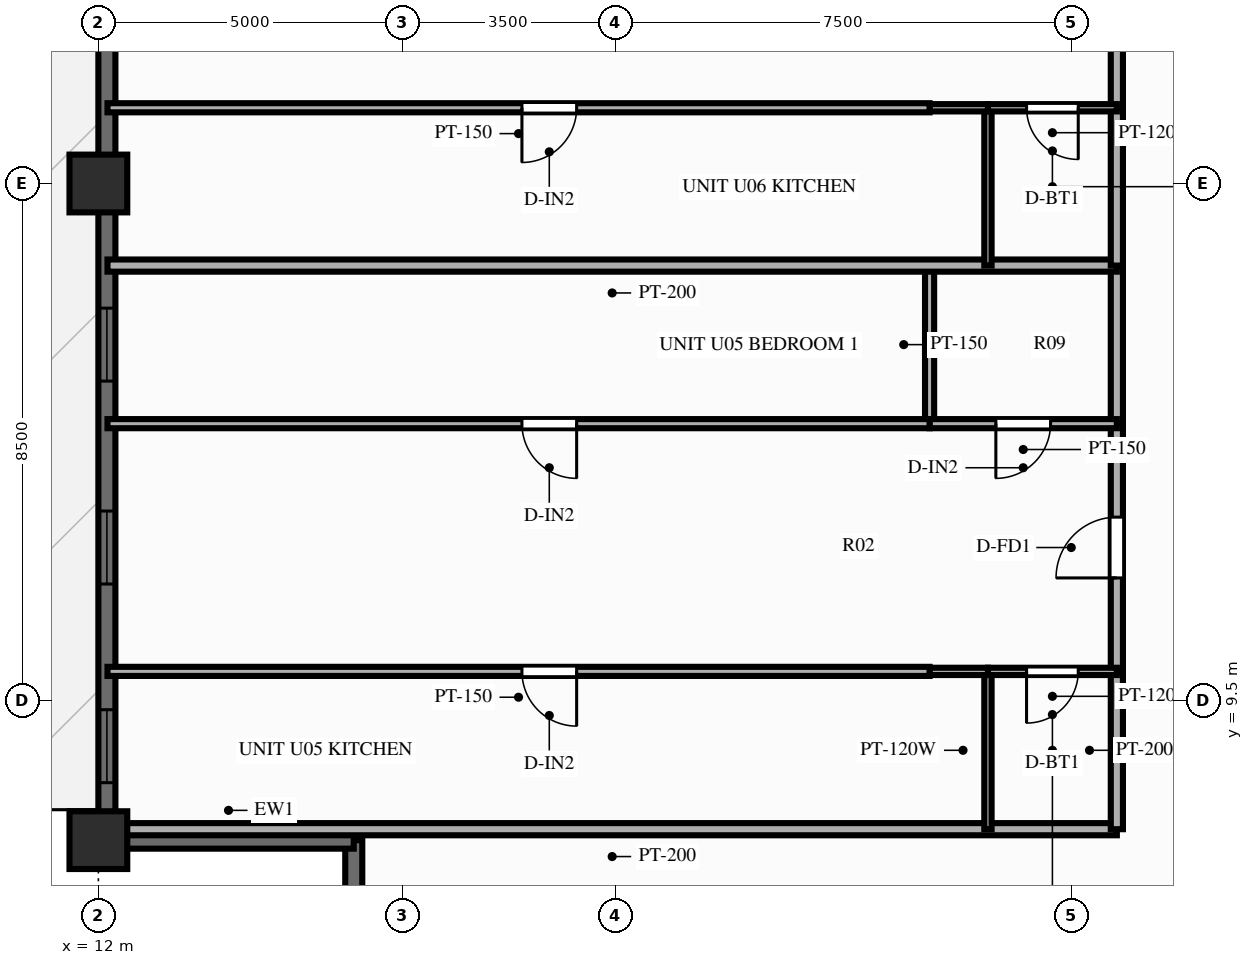
"""IFC4 building model, lengths in metres.
Left out: names, types, materials, properties, quantities, classifications, styles, units other than length and angle.
Written with IfcOpenShell. Run it as: python <this file> out.ifc"""

import sys

from ifc_helpers import new_model, si_unit, direction, frame, frame_2d, origin, origin_2d, place, context, subcontext, project, spatial, rectangle, extrude, source, transform, mapped, element, fill, save


model = new_model("IFC4")
c1 = context("Model", 3, precision=1e-05, world=origin(), true_north=direction((0.0, 1.0)))
c2 = subcontext(c1, "Body", "Model", "MODEL_VIEW")
j1 = project(units=[si_unit("LENGTHUNIT", "METRE"), si_unit("PLANEANGLEUNIT", "RADIAN")], contexts=[c1])
p1 = place(None, origin())
s1 = spatial("IfcSite", under=j1, at=p1, CompositionType="ELEMENT")
p2 = place(p1, origin())
s2 = spatial("IfcBuilding", under=s1, at=p2, CompositionType="ELEMENT")
p3 = place(p2, frame((0.0, 0.0, 113.85)))
s3 = spatial("IfcBuildingStorey", under=s2, at=p3, CompositionType="ELEMENT", Elevation=113.85)
m1 = source(origin(), c2, "Body", "SweptSolid", [
    extrude(rectangle(XDim=0.95, YDim=0.95, at=origin_2d()), origin(), (0.0, 0.0, 1.0), 3.0),
])
for number, where, z_axis, x_axis in (
    (1, (12.0, 18.0, 0.0), (0.0, 0.0, 1.0), (1.0, 0.0, 0.0)),
    (2, (12.0, 7.2, 0.0), (0.0, 0.0, 1.0), (1.0, 0.0, 0.0)),
):
    element("IfcColumn", number, at=place(p3, frame(where, z_axis=z_axis, x_axis=x_axis)), inside=s3, PredefinedType="COLUMN", context=c2, shape_type="MappedRepresentation", body=[
        mapped(m1, transform((0.0, 0.0, 0.0), scale=1.0)),
    ])
p4 = place(p3, frame((12.14, 7.2, 0.0), z_axis=(0.0, 0.0, 1.0), x_axis=(0.0, 1.0, 0.0)))
e3 = element("IfcWall", 3, at=p4, inside=s3, PredefinedType="SOLIDWALL", context=c2, shape_type="SweptSolid", body=[
    extrude(rectangle(XDim=39.6, YDim=0.28, at=frame_2d((19.8, 0.0))), origin(), (0.0, 0.0, 1.0), 2.28),
])
p5 = place(p4, frame((0.945, 0.0, 0.25)))
e4 = element("IfcOpeningElement", 4, at=p5, cuts=e3, PredefinedType="OPENING", context=c2, shape_type="SweptSolid", body=[
    extrude(rectangle(XDim=1.2, YDim=1.5, at=frame_2d((0.6, 0.75))), frame((0.0, 0.152, 0.0), z_axis=(0.0, -1.0, 0.0), x_axis=(1.0, 0.0, 0.0)), (0.0, 0.0, 1.0), 0.304),
])
p6 = place(p4, frame((4.213, 0.0, 0.25)))
e5 = element("IfcOpeningElement", 5, at=p6, cuts=e3, PredefinedType="OPENING", context=c2, shape_type="SweptSolid", body=[
    extrude(rectangle(XDim=1.2, YDim=1.5, at=frame_2d((0.6, 0.75))), frame((0.0, 0.152, 0.0), z_axis=(0.0, -1.0, 0.0), x_axis=(1.0, 0.0, 0.0)), (0.0, 0.0, 1.0), 0.304),
])
p7 = place(p4, frame((7.55, 0.0, 0.25)))
e6 = element("IfcOpeningElement", 6, at=p7, cuts=e3, PredefinedType="OPENING", context=c2, shape_type="SweptSolid", body=[
    extrude(rectangle(XDim=1.2, YDim=1.5, at=frame_2d((0.6, 0.75))), frame((0.0, 0.152, 0.0), z_axis=(0.0, -1.0, 0.0), x_axis=(1.0, 0.0, 0.0)), (0.0, 0.0, 1.0), 0.304),
])
p8 = place(p4, frame((13.483, 0.0, 0.25)))
e7 = element("IfcOpeningElement", 7, at=p8, cuts=e3, PredefinedType="OPENING", context=c2, shape_type="SweptSolid", body=[
    extrude(rectangle(XDim=1.2, YDim=1.5, at=frame_2d((0.6, 0.75))), frame((0.0, 0.152, 0.0), z_axis=(0.0, -1.0, 0.0), x_axis=(1.0, 0.0, 0.0)), (0.0, 0.0, 1.0), 0.304),
])
p9 = place(p4, frame((16.82, 0.0, 0.25)))
e8 = element("IfcOpeningElement", 8, at=p9, cuts=e3, PredefinedType="OPENING", context=c2, shape_type="SweptSolid", body=[
    extrude(rectangle(XDim=1.2, YDim=1.5, at=frame_2d((0.6, 0.75))), frame((0.0, 0.152, 0.0), z_axis=(0.0, -1.0, 0.0), x_axis=(1.0, 0.0, 0.0)), (0.0, 0.0, 1.0), 0.304),
])
p10 = place(p4, frame((19.2, 0.0, 0.25)))
e9 = element("IfcOpeningElement", 9, at=p10, cuts=e3, PredefinedType="OPENING", context=c2, shape_type="SweptSolid", body=[
    extrude(rectangle(XDim=1.2, YDim=1.5, at=frame_2d((0.6, 0.75))), frame((0.0, 0.152, 0.0), z_axis=(0.0, -1.0, 0.0), x_axis=(1.0, 0.0, 0.0)), (0.0, 0.0, 1.0), 0.304),
])
p11 = place(p4, frame((21.992, 0.0, 0.0)))
e10 = element("IfcOpeningElement", 10, at=p11, cuts=e3, PredefinedType="OPENING", context=c2, shape_type="SweptSolid", body=[
    extrude(rectangle(XDim=1.6, YDim=2.15, at=frame_2d((0.8, 1.075))), frame((0.0, 0.152, 0.0), z_axis=(0.0, -1.0, 0.0), x_axis=(1.0, 0.0, 0.0)), (0.0, 0.0, 1.0), 0.304),
])
p12 = place(p4, frame((25.529, 0.0, 0.25)))
e11 = element("IfcOpeningElement", 11, at=p12, cuts=e3, PredefinedType="OPENING", context=c2, shape_type="SweptSolid", body=[
    extrude(rectangle(XDim=1.2, YDim=1.5, at=frame_2d((0.6, 0.75))), frame((0.0, 0.152, 0.0), z_axis=(0.0, -1.0, 0.0), x_axis=(1.0, 0.0, 0.0)), (0.0, 0.0, 1.0), 0.304),
])
p13 = place(p4, frame((29.349, 0.0, 0.25)))
e12 = element("IfcOpeningElement", 12, at=p13, cuts=e3, PredefinedType="OPENING", context=c2, shape_type="SweptSolid", body=[
    extrude(rectangle(XDim=0.7, YDim=1.5, at=frame_2d((0.35, 0.75))), frame((0.0, 0.152, 0.0), z_axis=(0.0, -1.0, 0.0), x_axis=(1.0, 0.0, 0.0)), (0.0, 0.0, 1.0), 0.304),
])
p14 = place(p4, frame((31.285, 0.0, 0.25)))
e13 = element("IfcOpeningElement", 13, at=p14, cuts=e3, PredefinedType="OPENING", context=c2, shape_type="SweptSolid", body=[
    extrude(rectangle(XDim=1.2, YDim=1.5, at=frame_2d((0.6, 0.75))), frame((0.0, 0.152, 0.0), z_axis=(0.0, -1.0, 0.0), x_axis=(1.0, 0.0, 0.0)), (0.0, 0.0, 1.0), 0.304),
])
p15 = place(p4, frame((34.252, 0.0, 0.25)))
e14 = element("IfcOpeningElement", 14, at=p15, cuts=e3, PredefinedType="OPENING", context=c2, shape_type="SweptSolid", body=[
    extrude(rectangle(XDim=1.2, YDim=1.5, at=frame_2d((0.6, 0.75))), frame((0.0, 0.152, 0.0), z_axis=(0.0, -1.0, 0.0), x_axis=(1.0, 0.0, 0.0)), (0.0, 0.0, 1.0), 0.304),
])
p16 = place(p4, frame((37.151, 0.0, 0.25)))
e15 = element("IfcOpeningElement", 15, at=p16, cuts=e3, PredefinedType="OPENING", context=c2, shape_type="SweptSolid", body=[
    extrude(rectangle(XDim=1.2, YDim=1.5, at=frame_2d((0.6, 0.75))), frame((0.0, 0.152, 0.0), z_axis=(0.0, -1.0, 0.0), x_axis=(1.0, 0.0, 0.0)), (0.0, 0.0, 1.0), 0.304),
])
for number, where, z_axis, x_axis in (
    (16, (16.2, 3.08, 0.0), (0.0, 0.0, 1.0), (0.0, 1.0, 0.0)),
    (17, (12.08, 7.2, 0.0), (0.0, 0.0, 1.0), (1.0, 0.0, 0.0)),
):
    element("IfcWall", number, at=place(p3, frame(where, z_axis=z_axis, x_axis=x_axis)), inside=s3, PredefinedType="SOLIDWALL", context=c2, shape_type="SweptSolid", body=[
        extrude(rectangle(XDim=4.12, YDim=0.28, at=frame_2d((2.06, 0.0))), origin(), (0.0, 0.0, 1.0), 2.28),
    ])
p17 = place(p3, frame((28.75, 7.38, 0.0), z_axis=(0.0, 0.0, 1.0), x_axis=(-1.0, 0.0, 0.0)))
e18 = element("IfcWall", 18, at=p17, inside=s3, PredefinedType="PARTITIONING", context=c2, shape_type="SweptSolid", body=[
    extrude(rectangle(XDim=16.6, YDim=0.2, at=frame_2d((8.3, 0.0))), origin(), (0.0, 0.0, 1.0), 2.79),
])
p18 = place(p3, frame((28.75, 7.38, 0.0), z_axis=(0.0, 0.0, 1.0), x_axis=(0.0, 1.0, 0.0)))
e19 = element("IfcWall", 19, at=p18, inside=s3, PredefinedType="PARTITIONING", context=c2, shape_type="SweptSolid", body=[
    extrude(rectangle(XDim=2.596, YDim=0.2, at=frame_2d((1.298, 0.0))), origin(), (0.0, 0.0, 1.0), 2.79),
])
p19 = place(p3, frame((28.75, 9.976, 0.0), z_axis=(0.0, 0.0, 1.0), x_axis=(0.0, 1.0, 0.0)))
e20 = element("IfcWall", 20, at=p19, inside=s3, PredefinedType="PARTITIONING", context=c2, shape_type="SweptSolid", body=[
    extrude(rectangle(XDim=4.074, YDim=0.2, at=frame_2d((2.037, 0.0))), origin(), (0.0, 0.0, 1.0), 2.79),
])
p20 = place(p19, frame((1.537, 0.0, 0.0)))
e21 = element("IfcOpeningElement", 21, at=p20, cuts=e20, PredefinedType="OPENING", context=c2, shape_type="SweptSolid", body=[
    extrude(rectangle(XDim=1.0, YDim=2.15, at=frame_2d((0.5, 1.075))), frame((0.0, 0.112, 0.0), z_axis=(0.0, -1.0, 0.0), x_axis=(1.0, 0.0, 0.0)), (0.0, 0.0, 1.0), 0.224),
])
p21 = place(p3, frame((28.75, 14.05, 0.0), z_axis=(0.0, 0.0, 1.0), x_axis=(0.0, 1.0, 0.0)))
e22 = element("IfcWall", 22, at=p21, inside=s3, PredefinedType="PARTITIONING", context=c2, shape_type="SweptSolid", body=[
    extrude(rectangle(XDim=2.6, YDim=0.2, at=frame_2d((1.3, 0.0))), origin(), (0.0, 0.0, 1.0), 2.79),
])
p22 = place(p3, frame((26.63, 7.38, 0.0), z_axis=(0.0, 0.0, 1.0), x_axis=(0.0, 1.0, 0.0)))
e23 = element("IfcWall", 23, at=p22, inside=s3, PredefinedType="PARTITIONING", context=c2, shape_type="SweptSolid", body=[
    extrude(rectangle(XDim=2.596, YDim=0.12, at=frame_2d((1.298, 0.0))), origin(), (0.0, 0.0, 1.0), 2.79),
])
p23 = place(p3, frame((25.67, 14.05, 0.0), z_axis=(0.0, 0.0, 1.0), x_axis=(0.0, 1.0, 0.0)))
e24 = element("IfcWall", 24, at=p23, inside=s3, PredefinedType="PARTITIONING", context=c2, shape_type="SweptSolid", body=[
    extrude(rectangle(XDim=2.6, YDim=0.15, at=frame_2d((1.3, 0.0))), origin(), (0.0, 0.0, 1.0), 2.79),
])
p24 = place(p3, frame((28.75, 9.976, 0.0), z_axis=(0.0, 0.0, 1.0), x_axis=(-1.0, 0.0, 0.0)))
e25 = element("IfcWall", 25, at=p24, inside=s3, PredefinedType="PARTITIONING", context=c2, shape_type="SweptSolid", body=[
    extrude(rectangle(XDim=2.12, YDim=0.12, at=frame_2d((1.06, 0.0))), origin(), (0.0, 0.0, 1.0), 2.79),
])
p25 = place(p24, frame((0.635, 0.0, 0.0)))
e26 = element("IfcOpeningElement", 26, at=p25, cuts=e25, PredefinedType="OPENING", context=c2, shape_type="SweptSolid", body=[
    extrude(rectangle(XDim=0.85, YDim=2.05, at=frame_2d((0.425, 1.025))), frame((0.0, 0.072, 0.0), z_axis=(0.0, -1.0, 0.0), x_axis=(1.0, 0.0, 0.0)), (0.0, 0.0, 1.0), 0.144),
])
p26 = place(p3, frame((26.63, 9.976, 0.0), z_axis=(0.0, 0.0, 1.0), x_axis=(-1.0, 0.0, 0.0)))
e27 = element("IfcWall", 27, at=p26, inside=s3, PredefinedType="PARTITIONING", context=c2, shape_type="SweptSolid", body=[
    extrude(rectangle(XDim=0.96, YDim=0.12, at=frame_2d((0.48, 0.0))), origin(), (0.0, 0.0, 1.0), 2.79),
])
p27 = place(p3, frame((25.67, 9.976, 0.0), z_axis=(0.0, 0.0, 1.0), x_axis=(-1.0, 0.0, 0.0)))
e28 = element("IfcWall", 28, at=p27, inside=s3, PredefinedType="PARTITIONING", context=c2, shape_type="SweptSolid", body=[
    extrude(rectangle(XDim=13.52, YDim=0.15, at=frame_2d((6.76, 0.0))), origin(), (0.0, 0.0, 1.0), 2.79),
])
p28 = place(p27, frame((5.804, 0.0, 0.0)))
e29 = element("IfcOpeningElement", 29, at=p28, cuts=e28, PredefinedType="OPENING", context=c2, shape_type="SweptSolid", body=[
    extrude(rectangle(XDim=0.9, YDim=2.1, at=frame_2d((0.45, 1.05))), frame((0.0, 0.087, 0.0), z_axis=(0.0, -1.0, 0.0), x_axis=(1.0, 0.0, 0.0)), (0.0, 0.0, 1.0), 0.174),
])
p29 = place(p3, frame((28.75, 14.05, 0.0), z_axis=(0.0, 0.0, 1.0), x_axis=(-1.0, 0.0, 0.0)))
e30 = element("IfcWall", 30, at=p29, inside=s3, PredefinedType="PARTITIONING", context=c2, shape_type="SweptSolid", body=[
    extrude(rectangle(XDim=3.08, YDim=0.15, at=frame_2d((1.54, 0.0))), origin(), (0.0, 0.0, 1.0), 2.79),
])
p30 = place(p29, frame((1.09, 0.0, 0.0)))
e31 = element("IfcOpeningElement", 31, at=p30, cuts=e30, PredefinedType="OPENING", context=c2, shape_type="SweptSolid", body=[
    extrude(rectangle(XDim=0.9, YDim=2.1, at=frame_2d((0.45, 1.05))), frame((0.0, 0.087, 0.0), z_axis=(0.0, -1.0, 0.0), x_axis=(1.0, 0.0, 0.0)), (0.0, 0.0, 1.0), 0.174),
])
p31 = place(p3, frame((25.67, 14.05, 0.0), z_axis=(0.0, 0.0, 1.0), x_axis=(-1.0, 0.0, 0.0)))
e32 = element("IfcWall", 32, at=p31, inside=s3, PredefinedType="PARTITIONING", context=c2, shape_type="SweptSolid", body=[
    extrude(rectangle(XDim=13.52, YDim=0.15, at=frame_2d((6.76, 0.0))), origin(), (0.0, 0.0, 1.0), 2.79),
])
p32 = place(p31, frame((5.804, 0.0, 0.0)))
e33 = element("IfcOpeningElement", 33, at=p32, cuts=e32, PredefinedType="OPENING", context=c2, shape_type="SweptSolid", body=[
    extrude(rectangle(XDim=0.9, YDim=2.1, at=frame_2d((0.45, 1.05))), frame((0.0, 0.087, 0.0), z_axis=(0.0, -1.0, 0.0), x_axis=(1.0, 0.0, 0.0)), (0.0, 0.0, 1.0), 0.174),
])
p33 = place(p3, frame((28.75, 16.65, 0.0), z_axis=(0.0, 0.0, 1.0), x_axis=(-1.0, 0.0, 0.0)))
e34 = element("IfcWall", 34, at=p33, inside=s3, PredefinedType="PARTITIONING", context=c2, shape_type="SweptSolid", body=[
    extrude(rectangle(XDim=16.6, YDim=0.2, at=frame_2d((8.3, 0.0))), origin(), (0.0, 0.0, 1.0), 2.79),
])
p34 = place(p3, frame((28.75, 16.65, 0.0), z_axis=(0.0, 0.0, 1.0), x_axis=(0.0, 1.0, 0.0)))
e35 = element("IfcWall", 35, at=p34, inside=s3, PredefinedType="PARTITIONING", context=c2, shape_type="SweptSolid", body=[
    extrude(rectangle(XDim=2.596, YDim=0.2, at=frame_2d((1.298, 0.0))), origin(), (0.0, 0.0, 1.0), 2.79),
])
p35 = place(p3, frame((28.75, 19.246, 0.0), z_axis=(0.0, 0.0, 1.0), x_axis=(0.0, 1.0, 0.0)))
e36 = element("IfcWall", 36, at=p35, inside=s3, PredefinedType="PARTITIONING", context=c2, shape_type="SweptSolid", body=[
    extrude(rectangle(XDim=4.074, YDim=0.2, at=frame_2d((2.037, 0.0))), origin(), (0.0, 0.0, 1.0), 2.79),
])
p36 = place(p35, frame((1.537, 0.0, 0.0)))
e37 = element("IfcOpeningElement", 37, at=p36, cuts=e36, PredefinedType="OPENING", context=c2, shape_type="SweptSolid", body=[
    extrude(rectangle(XDim=1.0, YDim=2.15, at=frame_2d((0.5, 1.075))), frame((0.0, 0.112, 0.0), z_axis=(0.0, -1.0, 0.0), x_axis=(1.0, 0.0, 0.0)), (0.0, 0.0, 1.0), 0.224),
])
p37 = place(p3, frame((26.63, 16.65, 0.0), z_axis=(0.0, 0.0, 1.0), x_axis=(0.0, 1.0, 0.0)))
e38 = element("IfcWall", 38, at=p37, inside=s3, PredefinedType="PARTITIONING", context=c2, shape_type="SweptSolid", body=[
    extrude(rectangle(XDim=2.596, YDim=0.12, at=frame_2d((1.298, 0.0))), origin(), (0.0, 0.0, 1.0), 2.79),
])
p38 = place(p3, frame((28.75, 19.246, 0.0), z_axis=(0.0, 0.0, 1.0), x_axis=(-1.0, 0.0, 0.0)))
e39 = element("IfcWall", 39, at=p38, inside=s3, PredefinedType="PARTITIONING", context=c2, shape_type="SweptSolid", body=[
    extrude(rectangle(XDim=2.12, YDim=0.12, at=frame_2d((1.06, 0.0))), origin(), (0.0, 0.0, 1.0), 2.79),
])
p39 = place(p38, frame((0.635, 0.0, 0.0)))
e40 = element("IfcOpeningElement", 40, at=p39, cuts=e39, PredefinedType="OPENING", context=c2, shape_type="SweptSolid", body=[
    extrude(rectangle(XDim=0.85, YDim=2.05, at=frame_2d((0.425, 1.025))), frame((0.0, 0.072, 0.0), z_axis=(0.0, -1.0, 0.0), x_axis=(1.0, 0.0, 0.0)), (0.0, 0.0, 1.0), 0.144),
])
p40 = place(p3, frame((26.63, 19.246, 0.0), z_axis=(0.0, 0.0, 1.0), x_axis=(-1.0, 0.0, 0.0)))
e41 = element("IfcWall", 41, at=p40, inside=s3, PredefinedType="PARTITIONING", context=c2, shape_type="SweptSolid", body=[
    extrude(rectangle(XDim=0.96, YDim=0.12, at=frame_2d((0.48, 0.0))), origin(), (0.0, 0.0, 1.0), 2.79),
])
p41 = place(p3, frame((25.67, 19.246, 0.0), z_axis=(0.0, 0.0, 1.0), x_axis=(-1.0, 0.0, 0.0)))
e42 = element("IfcWall", 42, at=p41, inside=s3, PredefinedType="PARTITIONING", context=c2, shape_type="SweptSolid", body=[
    extrude(rectangle(XDim=13.52, YDim=0.15, at=frame_2d((6.76, 0.0))), origin(), (0.0, 0.0, 1.0), 2.79),
])
p42 = place(p41, frame((5.804, 0.0, 0.0)))
e43 = element("IfcOpeningElement", 43, at=p42, cuts=e42, PredefinedType="OPENING", context=c2, shape_type="SweptSolid", body=[
    extrude(rectangle(XDim=0.9, YDim=2.1, at=frame_2d((0.45, 1.05))), frame((0.0, 0.087, 0.0), z_axis=(0.0, -1.0, 0.0), x_axis=(1.0, 0.0, 0.0)), (0.0, 0.0, 1.0), 0.174),
])
m2 = source(origin(), c2, "Body", "SweptSolid", [
    extrude(rectangle(XDim=1.2, YDim=1.5, at=frame_2d((0.6, 0.75))), frame((0.0, 0.03, 0.0), z_axis=(0.0, -1.0, 0.0), x_axis=(1.0, 0.0, 0.0)), (0.0, 0.0, 1.0), 0.06),
])
p43 = place(p5, origin())
e44 = element("IfcWindow", 44, at=p43, inside=s3, PartitioningType="SINGLE_PANEL", PredefinedType="WINDOW", context=c2, shape_type="MappedRepresentation", body=[
    mapped(m2, transform((0.0, 0.0, 0.0), scale=1.0)),
])
fill(e4, e44)
p44 = place(p6, origin())
e45 = element("IfcWindow", 45, at=p44, inside=s3, PartitioningType="SINGLE_PANEL", PredefinedType="WINDOW", context=c2, shape_type="MappedRepresentation", body=[
    mapped(m2, transform((0.0, 0.0, 0.0), scale=1.0)),
])
fill(e5, e45)
p45 = place(p7, origin())
e46 = element("IfcWindow", 46, at=p45, inside=s3, PartitioningType="SINGLE_PANEL", PredefinedType="WINDOW", context=c2, shape_type="MappedRepresentation", body=[
    mapped(m2, transform((0.0, 0.0, 0.0), scale=1.0)),
])
fill(e6, e46)
m3 = source(origin(), c2, "Body", "SweptSolid", [
    extrude(rectangle(XDim=1.0, YDim=2.15, at=frame_2d((0.5, 1.075))), frame((0.0, 0.025, 0.0), z_axis=(0.0, -1.0, 0.0), x_axis=(1.0, 0.0, 0.0)), (0.0, 0.0, 1.0), 0.05),
])
p46 = place(p20, origin())
e47 = element("IfcDoor", 47, at=p46, inside=s3, OperationType="SINGLE_SWING_LEFT", PredefinedType="DOOR", context=c2, shape_type="MappedRepresentation", body=[
    mapped(m3, transform((0.0, 0.0, 0.0), scale=1.0)),
])
fill(e21, e47)
m4 = source(origin(), c2, "Body", "SweptSolid", [
    extrude(rectangle(XDim=0.85, YDim=2.05, at=frame_2d((0.425, 1.025))), frame((0.0, 0.025, 0.0), z_axis=(0.0, -1.0, 0.0), x_axis=(1.0, 0.0, 0.0)), (0.0, 0.0, 1.0), 0.05),
])
p47 = place(p25, origin())
e48 = element("IfcDoor", 48, at=p47, inside=s3, OperationType="SINGLE_SWING_RIGHT", PredefinedType="DOOR", context=c2, shape_type="MappedRepresentation", body=[
    mapped(m4, transform((0.0, 0.0, 0.0), scale=1.0)),
])
fill(e26, e48)
m5 = source(origin(), c2, "Body", "SweptSolid", [
    extrude(rectangle(XDim=0.9, YDim=2.1, at=frame_2d((0.45, 1.05))), frame((0.0, 0.025, 0.0), z_axis=(0.0, -1.0, 0.0), x_axis=(1.0, 0.0, 0.0)), (0.0, 0.0, 1.0), 0.05),
])
p48 = place(p28, origin())
e49 = element("IfcDoor", 49, at=p48, inside=s3, OperationType="SINGLE_SWING_LEFT", PredefinedType="DOOR", context=c2, shape_type="MappedRepresentation", body=[
    mapped(m5, transform((0.0, 0.0, 0.0), scale=1.0)),
])
fill(e29, e49)
p49 = place(p30, origin())
e50 = element("IfcDoor", 50, at=p49, inside=s3, OperationType="SINGLE_SWING_RIGHT", PredefinedType="DOOR", context=c2, shape_type="MappedRepresentation", body=[
    mapped(m5, transform((0.0, 0.0, 0.0), scale=1.0)),
])
fill(e31, e50)
p50 = place(p32, origin())
e51 = element("IfcDoor", 51, at=p50, inside=s3, OperationType="SINGLE_SWING_LEFT", PredefinedType="DOOR", context=c2, shape_type="MappedRepresentation", body=[
    mapped(m5, transform((0.0, 0.0, 0.0), scale=1.0)),
])
fill(e33, e51)
p51 = place(p39, origin())
e52 = element("IfcDoor", 52, at=p51, inside=s3, OperationType="SINGLE_SWING_LEFT", PredefinedType="DOOR", context=c2, shape_type="MappedRepresentation", body=[
    mapped(m4, transform((0.0, 0.0, 0.0), scale=1.0)),
])
fill(e40, e52)
p52 = place(p42, origin())
e53 = element("IfcDoor", 53, at=p52, inside=s3, OperationType="SINGLE_SWING_RIGHT", PredefinedType="DOOR", context=c2, shape_type="MappedRepresentation", body=[
    mapped(m5, transform((0.0, 0.0, 0.0), scale=1.0)),
])
fill(e43, e53)
save(model, sys.argv[1])
